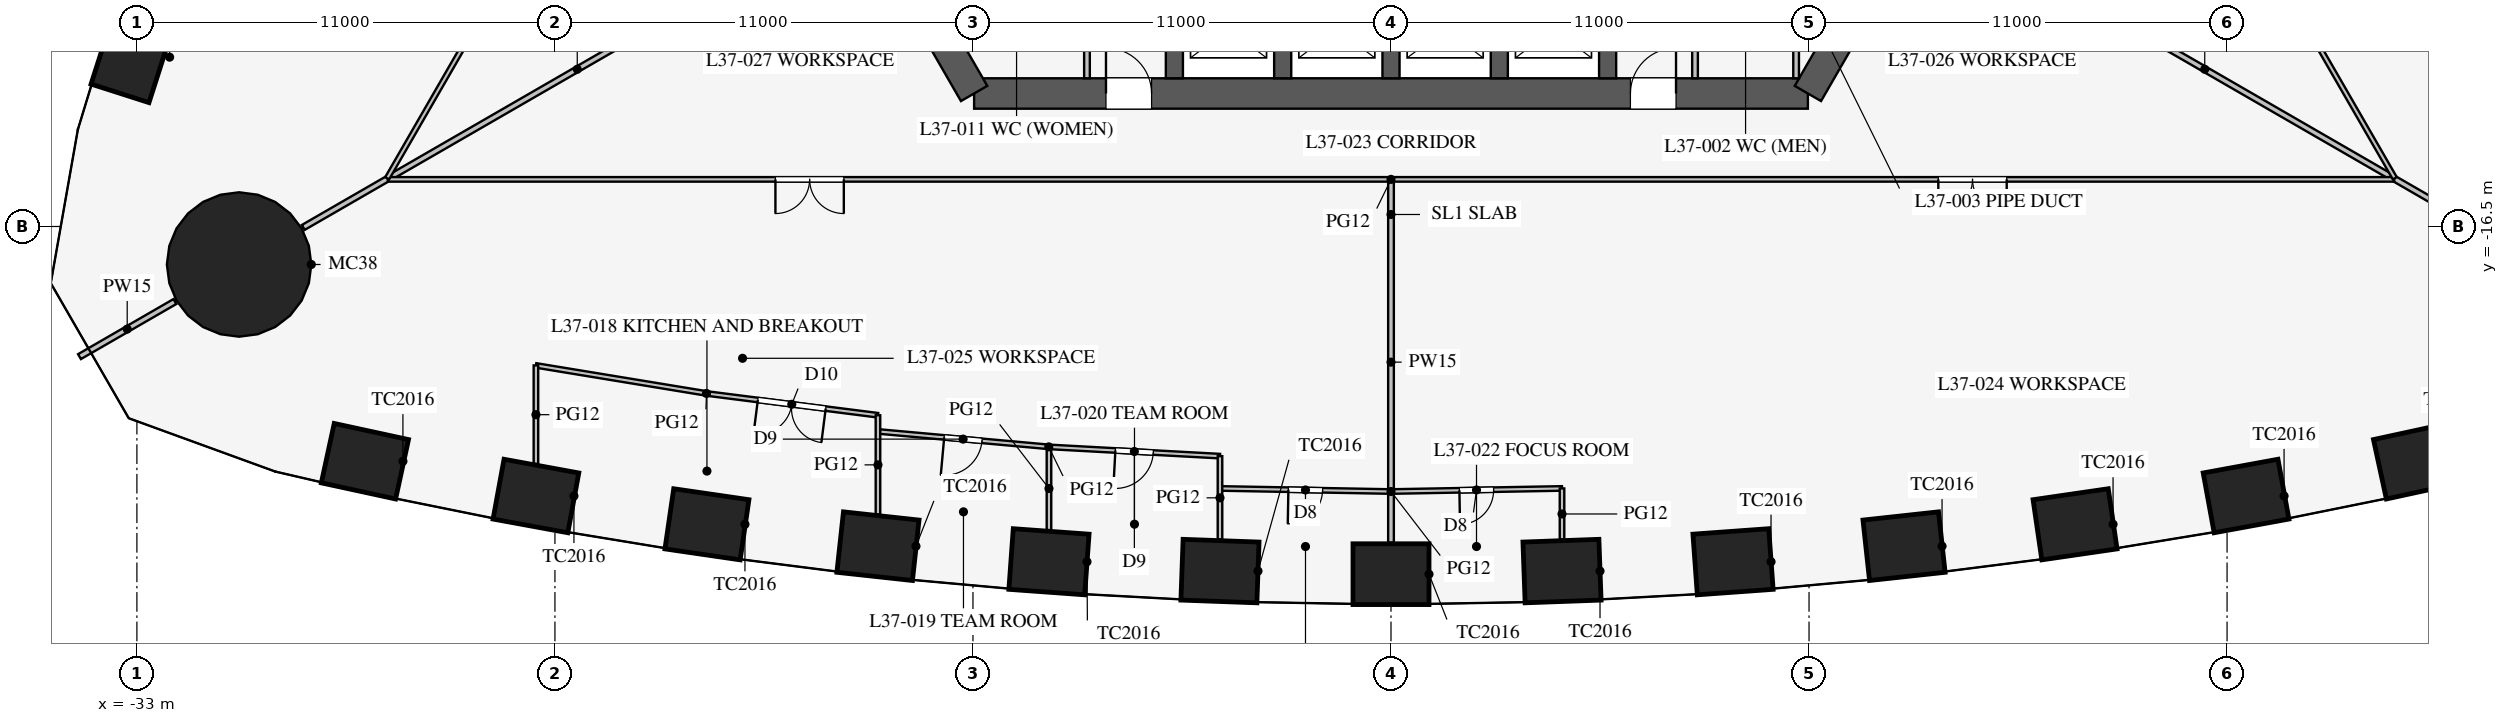
"""IFC4 building model, lengths in metres.
Left out: names, types, materials, properties, quantities, classifications, styles, units other than length and angle.
Written with IfcOpenShell. Run it as: python <this file> out.ifc"""

import sys

from ifc_helpers import new_model, si_unit, direction, frame, frame_2d, origin, origin_2d, place, context, subcontext, project, spatial, rectangle, circle, extrude, element, fill, save


model = new_model("IFC4")
c1 = context("Model", 3, precision=1e-05, world=origin(), true_north=direction((0.0, 1.0)))
c2 = subcontext(c1, "Body", "Model", "MODEL_VIEW")
j1 = project(units=[si_unit("LENGTHUNIT", "METRE"), si_unit("PLANEANGLEUNIT", "RADIAN")], contexts=[c1])
p1 = place(None, origin())
s1 = spatial("IfcSite", under=j1, at=p1, CompositionType="ELEMENT")
p2 = place(p1, origin())
s2 = spatial("IfcBuilding", under=s1, at=p2, CompositionType="ELEMENT")
p3 = place(p2, frame((0.0, 0.0, 161.9)))
s3 = spatial("IfcBuildingStorey", under=s2, at=p3, CompositionType="ELEMENT", Elevation=161.9)
for number, where, z_axis, x_axis in (
    (1, (-27.0, -22.677, 0.0), (0.0, 0.0, 1.0), (0.977, -0.212, 0.0)),
    (2, (-22.5, -23.593, 0.0), (0.0, 0.0, 1.0), (0.984, -0.18, 0.0)),
    (3, (-18.0, -24.337, 0.0), (0.0, 0.0, 1.0), (0.99, -0.144, 0.0)),
    (4, (-13.5, -24.913, 0.0), (0.0, 0.0, 1.0), (0.994, -0.108, 0.0)),
    (5, (-9.0, -25.323, 0.0), (0.0, 0.0, 1.0), (0.997, -0.072, 0.0)),
    (6, (-4.5, -25.568, 0.0), (0.0, 0.0, 1.0), (0.999, -0.036, 0.0)),
    (7, (0.0, -25.65, 0.0), (0.0, 0.0, 1.0), (1.0, 0.0, 0.0)),
    (8, (4.5, -25.568, 0.0), (0.0, 0.0, 1.0), (0.999, 0.036, 0.0)),
    (9, (9.0, -25.323, 0.0), (0.0, 0.0, 1.0), (0.997, 0.072, 0.0)),
    (10, (13.5, -24.913, 0.0), (0.0, 0.0, 1.0), (0.994, 0.108, 0.0)),
    (11, (18.0, -24.337, 0.0), (0.0, 0.0, 1.0), (0.99, 0.144, 0.0)),
    (12, (22.5, -23.593, 0.0), (0.0, 0.0, 1.0), (0.984, 0.18, 0.0)),
    (13, (27.0, -22.677, 0.0), (0.0, 0.0, 1.0), (0.977, 0.212, 0.0)),
    (14, (-33.139, -12.044, 0.0), (0.0, 0.0, 1.0), (-0.305, -0.952, 0.0)),
):
    element("IfcColumn", number, at=place(p3, frame(where, z_axis=z_axis, x_axis=x_axis)), inside=s3, PredefinedType="COLUMN", context=c2, shape_type="SweptSolid", body=[
        extrude(rectangle(XDim=2.0, YDim=1.6, at=origin_2d()), origin(), (0.0, 0.0, 1.0), 4.2),
    ])
p4 = place(p3, frame((-30.311, -17.5, 0.0), z_axis=(0.0, 0.0, 1.0), x_axis=(1.0, 0.0, 0.0)))
e15 = element("IfcColumn", 15, at=p4, inside=s3, PredefinedType="COLUMN", context=c2, shape_type="SweptSolid", body=[
    extrude(circle(Radius=1.9, at=origin_2d()), origin(), (0.0, 0.0, 1.0), 4.2),
])
p5 = place(p3, frame((-10.97, -13.0, 0.0), z_axis=(0.0, 0.0, 1.0), x_axis=(1.0, 0.0, 0.0)))
e16 = element("IfcWall", 16, at=p5, inside=s3, PredefinedType="SHEAR", context=c2, shape_type="SweptSolid", body=[
    extrude(rectangle(XDim=21.939, YDim=0.8, at=frame_2d((10.97, 0.0))), origin(), (0.0, 0.0, 1.0), 4.2),
])
p6 = place(p5, frame((17.27, 0.0, 0.0)))
e17 = element("IfcOpeningElement", 17, at=p6, cuts=e16, PredefinedType="OPENING", context=c2, shape_type="SweptSolid", body=[
    extrude(rectangle(XDim=1.2, YDim=2.1, at=frame_2d((0.6, 1.05))), frame((0.0, 0.41, 0.0), z_axis=(0.0, -1.0, 0.0), x_axis=(1.0, 0.0, 0.0)), (0.0, 0.0, 1.0), 0.82),
])
p7 = place(p5, frame((3.47, 0.0, 0.0)))
e18 = element("IfcOpeningElement", 18, at=p7, cuts=e16, PredefinedType="OPENING", context=c2, shape_type="SweptSolid", body=[
    extrude(rectangle(XDim=1.2, YDim=2.1, at=frame_2d((0.6, 1.05))), frame((0.0, 0.41, 0.0), z_axis=(0.0, -1.0, 0.0), x_axis=(1.0, 0.0, 0.0)), (0.0, 0.0, 1.0), 0.82),
])
for number, where, z_axis, x_axis in (
    (19, (10.97, -13.0, 0.0), (0.0, 0.0, 1.0), (0.5, 0.866, 0.0)),
    (20, (-16.743, -3.0, 0.0), (0.0, 0.0, 1.0), (0.5, -0.866, 0.0)),
):
    element("IfcWall", number, at=place(p3, frame(where, z_axis=z_axis, x_axis=x_axis)), inside=s3, PredefinedType="SHEAR", context=c2, shape_type="SweptSolid", body=[
        extrude(rectangle(XDim=11.547, YDim=0.8, at=frame_2d((5.773, 0.0))), origin(), (0.0, 0.0, 1.0), 4.2),
    ])
for number, where, z_axis, x_axis in (
    (21, (-5.7, -10.025, 0.0), (0.0, 0.0, 1.0), (0.0, -1.0, 0.0)),
    (22, (-2.85, -10.025, 0.0), (0.0, 0.0, 1.0), (0.0, -1.0, 0.0)),
    (23, (0.0, -10.025, 0.0), (0.0, 0.0, 1.0), (0.0, -1.0, 0.0)),
    (24, (2.85, -10.025, 0.0), (0.0, 0.0, 1.0), (0.0, -1.0, 0.0)),
    (25, (5.7, -10.025, 0.0), (0.0, 0.0, 1.0), (0.0, -1.0, 0.0)),
):
    element("IfcWall", number, at=place(p3, frame(where, z_axis=z_axis, x_axis=x_axis)), inside=s3, PredefinedType="SHEAR", context=c2, shape_type="SweptSolid", body=[
        extrude(rectangle(XDim=2.575, YDim=0.45, at=frame_2d((1.288, 0.0))), origin(), (0.0, 0.0, 1.0), 4.2),
    ])
p8 = place(p3, frame((8.0, -7.5, 0.0), z_axis=(0.0, 0.0, 1.0), x_axis=(0.0, -1.0, 0.0)))
e26 = element("IfcWall", 26, at=p8, inside=s3, PredefinedType="PARTITIONING", context=c2, shape_type="SweptSolid", body=[
    extrude(rectangle(XDim=5.1, YDim=0.15, at=frame_2d((2.55, 0.0))), origin(), (0.0, 0.0, 1.0), 4.0),
])
p9 = place(p8, frame((1.3, 0.0, 0.0)))
e27 = element("IfcOpeningElement", 27, at=p9, cuts=e26, PredefinedType="OPENING", context=c2, shape_type="SweptSolid", body=[
    extrude(rectangle(XDim=0.9, YDim=2.1, at=frame_2d((0.45, 1.05))), frame((0.0, 0.085, 0.0), z_axis=(0.0, -1.0, 0.0), x_axis=(1.0, 0.0, 0.0)), (0.0, 0.0, 1.0), 0.17),
])
p10 = place(p3, frame((-8.0, -7.5, 0.0), z_axis=(0.0, 0.0, 1.0), x_axis=(0.0, -1.0, 0.0)))
e28 = element("IfcWall", 28, at=p10, inside=s3, PredefinedType="PARTITIONING", context=c2, shape_type="SweptSolid", body=[
    extrude(rectangle(XDim=5.1, YDim=0.15, at=frame_2d((2.55, 0.0))), origin(), (0.0, 0.0, 1.0), 4.0),
])
p11 = place(p10, frame((2.6, 0.0, 0.0)))
e29 = element("IfcOpeningElement", 29, at=p11, cuts=e28, PredefinedType="OPENING", context=c2, shape_type="SweptSolid", body=[
    extrude(rectangle(XDim=0.9, YDim=2.1, at=frame_2d((0.45, 1.05))), frame((0.0, 0.085, 0.0), z_axis=(0.0, -1.0, 0.0), x_axis=(1.0, 0.0, 0.0)), (0.0, 0.0, 1.0), 0.17),
])
p12 = place(p3, frame((10.66, -8.5, 0.0), z_axis=(0.0, 0.0, 1.0), x_axis=(0.0, -1.0, 0.0)))
e30 = element("IfcWall", 30, at=p12, inside=s3, PredefinedType="PARTITIONING", context=c2, shape_type="SweptSolid", body=[
    extrude(rectangle(XDim=4.1, YDim=0.15, at=frame_2d((2.05, 0.0))), origin(), (0.0, 0.0, 1.0), 4.0),
])
for number, where, z_axis, x_axis in (
    (31, (14.203, -8.2, 0.0), (0.0, 0.0, 1.0), (0.866, -0.5, 0.0)),
    (32, (-14.203, -8.2, 0.0), (0.0, 0.0, 1.0), (-0.866, -0.5, 0.0)),
):
    element("IfcWall", number, at=place(p3, frame(where, z_axis=z_axis, x_axis=x_axis)), inside=s3, PredefinedType="PARTITIONING", context=c2, shape_type="SweptSolid", body=[
        extrude(rectangle(XDim=16.65, YDim=0.15, at=frame_2d((8.325, 0.0))), origin(), (0.0, 0.0, 1.0), 2.3),
    ])
p13 = place(p3, frame((-32.0, -18.475, 0.0), z_axis=(0.0, 0.0, 1.0), x_axis=(-0.866042548026, -0.499970304126, 0.0)))
e33 = element("IfcWall", 33, at=p13, inside=s3, PredefinedType="PARTITIONING", context=c2, shape_type="SweptSolid", body=[
    extrude(rectangle(XDim=2.899, YDim=0.15, at=frame_2d((1.45, 0.0))), origin(), (0.0, 0.0, 1.0), 2.3),
])
p14 = place(p3, frame((0.0, -15.32, 0.0), z_axis=(0.0, 0.0, 1.0), x_axis=(0.0, -1.0, 0.0)))
e34 = element("IfcWall", 34, at=p14, inside=s3, PredefinedType="PARTITIONING", context=c2, shape_type="SweptSolid", body=[
    extrude(rectangle(XDim=9.5, YDim=0.15, at=frame_2d((4.75, 0.0))), origin(), (0.0, 0.0, 1.0), 2.8),
])
p15 = place(p3, frame((-26.398, -15.26, 0.0), z_axis=(0.0, 0.0, 1.0), x_axis=(1.0, 0.0, 0.0)))
e35 = element("IfcWall", 35, at=p15, inside=s3, PredefinedType="PARTITIONING", context=c2, shape_type="SweptSolid", body=[
    extrude(rectangle(XDim=52.796, YDim=0.12, at=frame_2d((26.398, 0.0))), origin(), (0.0, 0.0, 1.0), 2.9),
])
p16 = place(p15, frame((10.2, 0.0, 0.15)))
e36 = element("IfcOpeningElement", 36, at=p16, cuts=e35, PredefinedType="OPENING", context=c2, shape_type="SweptSolid", body=[
    extrude(rectangle(XDim=1.8, YDim=2.1, at=frame_2d((0.9, 1.05))), frame((0.0, 0.07, 0.0), z_axis=(0.0, -1.0, 0.0), x_axis=(1.0, 0.0, 0.0)), (0.0, 0.0, 1.0), 0.14),
])
p17 = place(p15, frame((40.8, 0.0, 0.15)))
e37 = element("IfcOpeningElement", 37, at=p17, cuts=e35, PredefinedType="OPENING", context=c2, shape_type="SweptSolid", body=[
    extrude(rectangle(XDim=1.8, YDim=2.1, at=frame_2d((0.9, 1.05))), frame((0.0, 0.07, 0.0), z_axis=(0.0, -1.0, 0.0), x_axis=(1.0, 0.0, 0.0)), (0.0, 0.0, 1.0), 0.14),
])
p18 = place(p3, frame((0.0, -23.475, 0.0), z_axis=(0.0, 0.0, 1.0), x_axis=(0.999837820638, 0.018009231578, 0.0)))
e38 = element("IfcWall", 38, at=p18, inside=s3, PredefinedType="PARTITIONING", context=c2, shape_type="SweptSolid", body=[
    extrude(rectangle(XDim=4.501, YDim=0.12, at=frame_2d((2.25, 0.0))), origin(), (0.0, 0.0, 1.0), 2.9),
])
p19 = place(p18, frame((1.8, 0.0, 0.15)))
e39 = element("IfcOpeningElement", 39, at=p19, cuts=e38, PredefinedType="OPENING", context=c2, shape_type="SweptSolid", body=[
    extrude(rectangle(XDim=0.9, YDim=2.1, at=frame_2d((0.45, 1.05))), frame((0.0, 0.07, 0.0), z_axis=(0.0, -1.0, 0.0), x_axis=(1.0, 0.0, 0.0)), (0.0, 0.0, 1.0), 0.14),
])
p20 = place(p3, frame((-13.5, -21.893, 0.0), z_axis=(0.0, 0.0, 1.0), x_axis=(0.995935173755, -0.090072913121, 0.0)))
e40 = element("IfcWall", 40, at=p20, inside=s3, PredefinedType="PARTITIONING", context=c2, shape_type="SweptSolid", body=[
    extrude(rectangle(XDim=4.518, YDim=0.12, at=frame_2d((2.259, 0.0))), origin(), (0.0, 0.0, 1.0), 2.9),
])
p21 = place(p20, frame((1.75, 0.0, 0.15)))
e41 = element("IfcOpeningElement", 41, at=p21, cuts=e40, PredefinedType="OPENING", context=c2, shape_type="SweptSolid", body=[
    extrude(rectangle(XDim=1.0, YDim=2.1, at=frame_2d((0.5, 1.05))), frame((0.0, 0.07, 0.0), z_axis=(0.0, -1.0, 0.0), x_axis=(1.0, 0.0, 0.0)), (0.0, 0.0, 1.0), 0.14),
])
p22 = place(p3, frame((-18.0, -20.896, 0.0), z_axis=(0.0, 0.0, 1.0), x_axis=(0.992010652594, -0.12615413247, 0.0)))
e42 = element("IfcWall", 42, at=p22, inside=s3, PredefinedType="PARTITIONING", context=c2, shape_type="SweptSolid", body=[
    extrude(rectangle(XDim=4.536, YDim=0.12, at=frame_2d((2.268, 0.0))), origin(), (0.0, 0.0, 1.0), 2.9),
])
p23 = place(p22, frame((1.35, 0.0, 0.15)))
e43 = element("IfcOpeningElement", 43, at=p23, cuts=e42, PredefinedType="OPENING", context=c2, shape_type="SweptSolid", body=[
    extrude(rectangle(XDim=1.8, YDim=2.1, at=frame_2d((0.9, 1.05))), frame((0.0, 0.07, 0.0), z_axis=(0.0, -1.0, 0.0), x_axis=(1.0, 0.0, 0.0)), (0.0, 0.0, 1.0), 0.14),
])
p24 = place(p3, frame((-22.5, -20.156, 0.0), z_axis=(0.0, 0.0, 1.0), x_axis=(0.986764681833, -0.162158757664, 0.0)))
e44 = element("IfcWall", 44, at=p24, inside=s3, PredefinedType="PARTITIONING", context=c2, shape_type="SweptSolid", body=[
    extrude(rectangle(XDim=4.56, YDim=0.12, at=frame_2d((2.28, 0.0))), origin(), (0.0, 0.0, 1.0), 2.9),
])
p25 = place(p3, frame((-4.5, -23.394, 0.0), z_axis=(0.0, 0.0, 1.0), x_axis=(0.999837820638, -0.018009231578, 0.0)))
e45 = element("IfcWall", 45, at=p25, inside=s3, PredefinedType="PARTITIONING", context=c2, shape_type="SweptSolid", body=[
    extrude(rectangle(XDim=4.501, YDim=0.12, at=frame_2d((2.25, 0.0))), origin(), (0.0, 0.0, 1.0), 2.9),
])
p26 = place(p25, frame((1.8, 0.0, 0.15)))
e46 = element("IfcOpeningElement", 46, at=p26, cuts=e45, PredefinedType="OPENING", context=c2, shape_type="SweptSolid", body=[
    extrude(rectangle(XDim=0.9, YDim=2.1, at=frame_2d((0.45, 1.05))), frame((0.0, 0.07, 0.0), z_axis=(0.0, -1.0, 0.0), x_axis=(1.0, 0.0, 0.0)), (0.0, 0.0, 1.0), 0.14),
])
p27 = place(p3, frame((-9.0, -22.3, 0.0), z_axis=(0.0, 0.0, 1.0), x_axis=(0.998537376538, -0.054065771581, 0.0)))
e47 = element("IfcWall", 47, at=p27, inside=s3, PredefinedType="PARTITIONING", context=c2, shape_type="SweptSolid", body=[
    extrude(rectangle(XDim=4.507, YDim=0.12, at=frame_2d((2.253, 0.0))), origin(), (0.0, 0.0, 1.0), 2.9),
])
p28 = place(p27, frame((1.75, 0.0, 0.15)))
e48 = element("IfcOpeningElement", 48, at=p28, cuts=e47, PredefinedType="OPENING", context=c2, shape_type="SweptSolid", body=[
    extrude(rectangle(XDim=1.0, YDim=2.1, at=frame_2d((0.5, 1.05))), frame((0.0, 0.07, 0.0), z_axis=(0.0, -1.0, 0.0), x_axis=(1.0, 0.0, 0.0)), (0.0, 0.0, 1.0), 0.14),
])
p29 = place(p3, frame((4.5, -23.394, 0.0), z_axis=(0.0, 0.0, 1.0), x_axis=(0.0, -1.0, 0.0)))
e49 = element("IfcWall", 49, at=p29, inside=s3, PredefinedType="PARTITIONING", context=c2, shape_type="SweptSolid", body=[
    extrude(rectangle(XDim=1.344, YDim=0.12, at=frame_2d((0.672, 0.0))), origin(), (0.0, 0.0, 1.0), 2.8),
])
p30 = place(p3, frame((-13.5, -21.468, 0.0), z_axis=(0.0, 0.0, 1.0), x_axis=(0.0, -1.0, 0.0)))
e50 = element("IfcWall", 50, at=p30, inside=s3, PredefinedType="PARTITIONING", context=c2, shape_type="SweptSolid", body=[
    extrude(rectangle(XDim=2.61, YDim=0.12, at=frame_2d((1.305, 0.0))), origin(), (0.0, 0.0, 1.0), 2.6),
])
p31 = place(p3, frame((-22.5, -20.156, 0.0), z_axis=(0.0, 0.0, 1.0), x_axis=(0.0, -1.0, 0.0)))
e51 = element("IfcWall", 51, at=p31, inside=s3, PredefinedType="PARTITIONING", context=c2, shape_type="SweptSolid", body=[
    extrude(rectangle(XDim=2.593, YDim=0.12, at=frame_2d((1.296, 0.0))), origin(), (0.0, 0.0, 1.0), 2.9),
])
p32 = place(p3, frame((-4.5, -22.543, 0.0), z_axis=(0.0, 0.0, 1.0), x_axis=(0.0, -1.0, 0.0)))
e52 = element("IfcWall", 52, at=p32, inside=s3, PredefinedType="PARTITIONING", context=c2, shape_type="SweptSolid", body=[
    extrude(rectangle(XDim=2.194, YDim=0.12, at=frame_2d((1.097, 0.0))), origin(), (0.0, 0.0, 1.0), 2.8),
])
p33 = place(p3, frame((-9.0, -22.3, 0.0), z_axis=(0.0, 0.0, 1.0), x_axis=(0.0, -1.0, 0.0)))
e53 = element("IfcWall", 53, at=p33, inside=s3, PredefinedType="PARTITIONING", context=c2, shape_type="SweptSolid", body=[
    extrude(rectangle(XDim=2.191, YDim=0.12, at=frame_2d((1.095, 0.0))), origin(), (0.0, 0.0, 1.0), 2.9),
])
p34 = place(p3, frame((26.415, -15.231, 0.0), z_axis=(0.0, 0.0, 1.0), x_axis=(-0.50000091641, 0.866024874695, 0.0)))
e54 = element("IfcWall", 54, at=p34, inside=s3, PredefinedType="PARTITIONING", context=c2, shape_type="SweptSolid", body=[
    extrude(rectangle(XDim=52.796, YDim=0.12, at=frame_2d((26.398, 0.0))), origin(), (0.0, 0.0, 1.0), 2.9),
])
p35 = place(p34, frame((10.2, 0.0, 0.15)))
e55 = element("IfcOpeningElement", 55, at=p35, cuts=e54, PredefinedType="OPENING", context=c2, shape_type="SweptSolid", body=[
    extrude(rectangle(XDim=1.8, YDim=2.1, at=frame_2d((0.9, 1.05))), frame((0.0, 0.07, 0.0), z_axis=(0.0, -1.0, 0.0), x_axis=(1.0, 0.0, 0.0)), (0.0, 0.0, 1.0), 0.14),
])
p36 = place(p34, frame((40.8, 0.0, 0.15)))
e56 = element("IfcOpeningElement", 56, at=p36, cuts=e54, PredefinedType="OPENING", context=c2, shape_type="SweptSolid", body=[
    extrude(rectangle(XDim=1.8, YDim=2.1, at=frame_2d((0.9, 1.05))), frame((0.0, 0.07, 0.0), z_axis=(0.0, -1.0, 0.0), x_axis=(1.0, 0.0, 0.0)), (0.0, 0.0, 1.0), 0.14),
])
p37 = place(p3, frame((-0.016, 30.491, 0.0), z_axis=(0.0, 0.0, 1.0), x_axis=(-0.50000091641, -0.866024874695, 0.0)))
e57 = element("IfcWall", 57, at=p37, inside=s3, PredefinedType="PARTITIONING", context=c2, shape_type="SweptSolid", body=[
    extrude(rectangle(XDim=52.796, YDim=0.12, at=frame_2d((26.398, 0.0))), origin(), (0.0, 0.0, 1.0), 2.9),
])
p38 = place(p37, frame((10.2, 0.0, 0.15)))
e58 = element("IfcOpeningElement", 58, at=p38, cuts=e57, PredefinedType="OPENING", context=c2, shape_type="SweptSolid", body=[
    extrude(rectangle(XDim=1.8, YDim=2.1, at=frame_2d((0.9, 1.05))), frame((0.0, 0.07, 0.0), z_axis=(0.0, -1.0, 0.0), x_axis=(1.0, 0.0, 0.0)), (0.0, 0.0, 1.0), 0.14),
])
p39 = place(p37, frame((40.8, 0.0, 0.15)))
e59 = element("IfcOpeningElement", 59, at=p39, cuts=e57, PredefinedType="OPENING", context=c2, shape_type="SweptSolid", body=[
    extrude(rectangle(XDim=1.8, YDim=2.1, at=frame_2d((0.9, 1.05))), frame((0.0, 0.07, 0.0), z_axis=(0.0, -1.0, 0.0), x_axis=(1.0, 0.0, 0.0)), (0.0, 0.0, 1.0), 0.14),
])
p40 = place(p6, origin())
e60 = element("IfcDoor", 60, at=p40, inside=s3, OperationType="SINGLE_SWING_RIGHT", PredefinedType="DOOR", context=c2, shape_type="SweptSolid", body=[
    extrude(rectangle(XDim=1.2, YDim=2.1, at=frame_2d((0.6, 1.05))), frame((0.0, 0.025, 0.0), z_axis=(0.0, -1.0, 0.0), x_axis=(1.0, 0.0, 0.0)), (0.0, 0.0, 1.0), 0.05),
])
fill(e17, e60)
p41 = place(p7, origin())
e61 = element("IfcDoor", 61, at=p41, inside=s3, OperationType="SINGLE_SWING_LEFT", PredefinedType="DOOR", context=c2, shape_type="SweptSolid", body=[
    extrude(rectangle(XDim=1.2, YDim=2.1, at=frame_2d((0.6, 1.05))), frame((0.0, 0.025, 0.0), z_axis=(0.0, -1.0, 0.0), x_axis=(1.0, 0.0, 0.0)), (0.0, 0.0, 1.0), 0.05),
])
fill(e18, e61)
p42 = place(p23, frame((1.8, 0.0, 0.0), z_axis=(0.0, 0.0, 1.0), x_axis=(-1.0, 0.0, 0.0)))
e62 = element("IfcDoor", 62, at=p42, inside=s3, OperationType="DOUBLE_DOOR_SINGLE_SWING", PredefinedType="DOOR", context=c2, shape_type="SweptSolid", body=[
    extrude(rectangle(XDim=1.8, YDim=2.1, at=frame_2d((0.9, 1.05))), frame((0.0, 0.025, 0.0), z_axis=(0.0, -1.0, 0.0), x_axis=(1.0, 0.0, 0.0)), (0.0, 0.0, 1.0), 0.05),
])
fill(e43, e62)
p43 = place(p21, frame((1.0, 0.0, 0.0), z_axis=(0.0, 0.0, 1.0), x_axis=(-1.0, 0.0, 0.0)))
e63 = element("IfcDoor", 63, at=p43, inside=s3, OperationType="SINGLE_SWING_RIGHT", PredefinedType="DOOR", context=c2, shape_type="SweptSolid", body=[
    extrude(rectangle(XDim=1.0, YDim=2.1, at=frame_2d((0.5, 1.05))), frame((0.0, 0.025, 0.0), z_axis=(0.0, -1.0, 0.0), x_axis=(1.0, 0.0, 0.0)), (0.0, 0.0, 1.0), 0.05),
])
fill(e41, e63)
p44 = place(p28, frame((1.0, 0.0, 0.0), z_axis=(0.0, 0.0, 1.0), x_axis=(-1.0, 0.0, 0.0)))
e64 = element("IfcDoor", 64, at=p44, inside=s3, OperationType="SINGLE_SWING_RIGHT", PredefinedType="DOOR", context=c2, shape_type="SweptSolid", body=[
    extrude(rectangle(XDim=1.0, YDim=2.1, at=frame_2d((0.5, 1.05))), frame((0.0, 0.025, 0.0), z_axis=(0.0, -1.0, 0.0), x_axis=(1.0, 0.0, 0.0)), (0.0, 0.0, 1.0), 0.05),
])
fill(e48, e64)
p45 = place(p26, frame((0.9, 0.0, 0.0), z_axis=(0.0, 0.0, 1.0), x_axis=(-1.0, 0.0, 0.0)))
e65 = element("IfcDoor", 65, at=p45, inside=s3, OperationType="SINGLE_SWING_RIGHT", PredefinedType="DOOR", context=c2, shape_type="SweptSolid", body=[
    extrude(rectangle(XDim=0.9, YDim=2.1, at=frame_2d((0.45, 1.05))), frame((0.0, 0.025, 0.0), z_axis=(0.0, -1.0, 0.0), x_axis=(1.0, 0.0, 0.0)), (0.0, 0.0, 1.0), 0.05),
])
fill(e46, e65)
p46 = place(p19, frame((0.9, 0.0, 0.0), z_axis=(0.0, 0.0, 1.0), x_axis=(-1.0, 0.0, 0.0)))
e66 = element("IfcDoor", 66, at=p46, inside=s3, OperationType="SINGLE_SWING_RIGHT", PredefinedType="DOOR", context=c2, shape_type="SweptSolid", body=[
    extrude(rectangle(XDim=0.9, YDim=2.1, at=frame_2d((0.45, 1.05))), frame((0.0, 0.025, 0.0), z_axis=(0.0, -1.0, 0.0), x_axis=(1.0, 0.0, 0.0)), (0.0, 0.0, 1.0), 0.05),
])
fill(e39, e66)
p47 = place(p16, frame((1.8, 0.0, 0.0), z_axis=(0.0, 0.0, 1.0), x_axis=(-1.0, 0.0, 0.0)))
e67 = element("IfcDoor", 67, at=p47, inside=s3, OperationType="DOUBLE_DOOR_SINGLE_SWING", PredefinedType="DOOR", context=c2, shape_type="SweptSolid", body=[
    extrude(rectangle(XDim=1.8, YDim=2.1, at=frame_2d((0.9, 1.05))), frame((0.0, 0.025, 0.0), z_axis=(0.0, -1.0, 0.0), x_axis=(1.0, 0.0, 0.0)), (0.0, 0.0, 1.0), 0.05),
])
fill(e36, e67)
p48 = place(p17, frame((1.8, 0.0, 0.0), z_axis=(0.0, 0.0, 1.0), x_axis=(-1.0, 0.0, 0.0)))
e68 = element("IfcDoor", 68, at=p48, inside=s3, OperationType="DOUBLE_DOOR_SINGLE_SWING", PredefinedType="DOOR", context=c2, shape_type="SweptSolid", body=[
    extrude(rectangle(XDim=1.8, YDim=2.1, at=frame_2d((0.9, 1.05))), frame((0.0, 0.025, 0.0), z_axis=(0.0, -1.0, 0.0), x_axis=(1.0, 0.0, 0.0)), (0.0, 0.0, 1.0), 0.05),
])
fill(e37, e68)
save(model, sys.argv[1])
